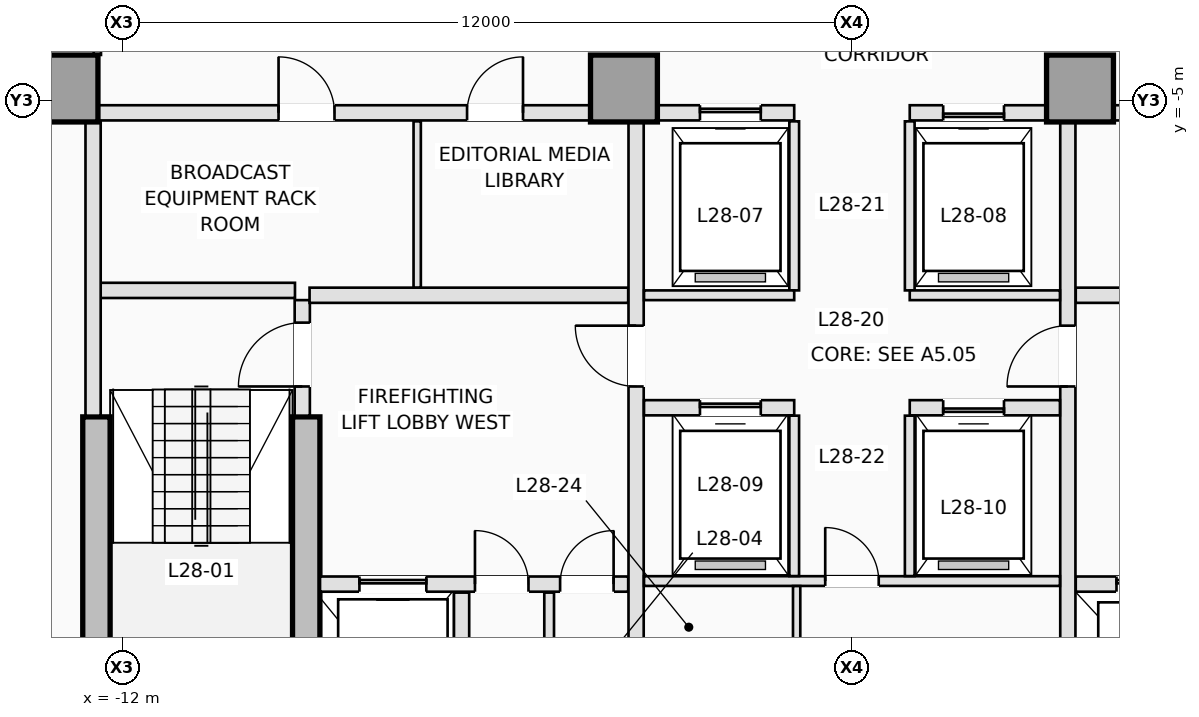
"""IFC4 building model, lengths in metres.
Left out: names, types, materials, properties, quantities, classifications, styles, units other than length and angle.
Written with IfcOpenShell. Run it as: python <this file> out.ifc"""

import sys

from ifc_helpers import new_model, si_unit, direction, frame, frame_2d, origin, origin_2d, place, context, subcontext, project, spatial, rectangle, extrude, element, fill, save


model = new_model("IFC4")
c1 = context("Model", 3, precision=1e-05, world=origin(), true_north=direction((0.0, 1.0)))
c2 = subcontext(c1, "Body", "Model", "MODEL_VIEW")
j1 = project(units=[si_unit("LENGTHUNIT", "METRE"), si_unit("PLANEANGLEUNIT", "RADIAN")], contexts=[c1])
p1 = place(None, origin())
s1 = spatial("IfcSite", under=j1, at=p1, CompositionType="ELEMENT")
p2 = place(p1, origin())
s2 = spatial("IfcBuilding", under=s1, at=p2, CompositionType="ELEMENT")
p3 = place(p2, frame((0.0, 0.0, 105.5)))
s3 = spatial("IfcBuildingStorey", under=s2, at=p3, CompositionType="ELEMENT", Elevation=105.5)
p4 = place(p3, frame((-12.425, -15.725, 0.0), z_axis=(0.0, 0.0, 1.0), x_axis=(0.0, 1.0, 0.0)))
e1 = element("IfcWall", 1, at=p4, inside=s3, PredefinedType="SHEAR", context=c2, shape_type="SweptSolid", body=[
    extrude(rectangle(XDim=5.525, YDim=0.45, at=frame_2d((2.763, 0.0))), origin(), (0.0, 0.0, 1.0), 3.5),
])
p5 = place(p3, frame((-8.975, -16.15, 0.0), z_axis=(0.0, 0.0, 1.0), x_axis=(0.0, 1.0, 0.0)))
e2 = element("IfcWall", 2, at=p5, inside=s3, PredefinedType="SHEAR", context=c2, shape_type="SweptSolid", body=[
    extrude(rectangle(XDim=5.95, YDim=0.45, at=frame_2d((2.975, 0.0))), origin(), (0.0, 0.0, 1.0), 3.5),
])
for number, where, z_axis, x_axis in (
    (3, (-12.95, -4.8, 0.0), (0.0, 0.0, 1.0), (1.0, 0.0, 0.0)),
    (4, (-3.75, -4.8, 0.0), (0.0, 0.0, 1.0), (1.0, 0.0, 0.0)),
    (5, (3.75, -4.8, 0.0), (0.0, 0.0, 1.0), (1.0, 0.0, 0.0)),
):
    element("IfcColumn", number, at=place(p3, frame(where, z_axis=z_axis, x_axis=x_axis)), inside=s3, PredefinedType="COLUMN", context=c2, shape_type="SweptSolid", body=[
        extrude(rectangle(XDim=1.1, YDim=1.1, at=origin_2d()), origin(), (0.0, 0.0, 1.0), 3.5),
    ])
p6 = place(p3, frame((-9.04, -10.18, 0.0), z_axis=(0.0, 0.0, 1.0), x_axis=(0.0, 1.0, 0.0)))
e6 = element("IfcWall", 6, at=p6, inside=s3, PredefinedType="PARTITIONING", context=c2, shape_type="SweptSolid", body=[
    extrude(rectangle(XDim=1.9, YDim=0.25, at=frame_2d((0.95, 0.0))), origin(), (0.0, 0.0, 1.0), 3.25),
])
p7 = place(p6, frame((0.48, 0.0, 0.0)))
e7 = element("IfcOpeningElement", 7, at=p7, cuts=e6, PredefinedType="OPENING", context=c2, shape_type="SweptSolid", body=[
    extrude(rectangle(XDim=1.05, YDim=2.15, at=frame_2d((0.525, 1.075))), frame((0.0, 0.135, 0.0), z_axis=(0.0, -1.0, 0.0), x_axis=(1.0, 0.0, 0.0)), (0.0, 0.0, 1.0), 0.27),
])
p8 = place(p3, frame((-12.38, -8.12, 0.0), z_axis=(0.0, 0.0, 1.0), x_axis=(1.0, 0.0, 0.0)))
e8 = element("IfcWall", 8, at=p8, inside=s3, PredefinedType="PARTITIONING", context=c2, shape_type="SweptSolid", body=[
    extrude(rectangle(XDim=3.22, YDim=0.25, at=frame_2d((1.61, 0.0))), origin(), (0.0, 0.0, 1.0), 3.25),
])
p9 = place(p3, frame((-12.48, -10.18, 0.0), z_axis=(0.0, 0.0, 1.0), x_axis=(0.0, 1.0, 0.0)))
e9 = element("IfcWall", 9, at=p9, inside=s3, PredefinedType="PARTITIONING", context=c2, shape_type="SweptSolid", body=[
    extrude(rectangle(XDim=4.828, YDim=0.25, at=frame_2d((2.414, 0.0))), origin(), (0.0, 0.0, 1.0), 3.25),
])
p10 = place(p3, frame((-8.748, -12.95, 0.0), z_axis=(0.0, 0.0, 1.0), x_axis=(1.0, 0.0, 0.0)))
e10 = element("IfcWall", 10, at=p10, inside=s3, PredefinedType="PARTITIONING", context=c2, shape_type="SweptSolid", body=[
    extrude(rectangle(XDim=5.068, YDim=0.25, at=frame_2d((2.534, 0.0))), origin(), (0.0, 0.0, 1.0), 3.25),
])
p11 = place(p10, frame((0.648, 0.0, 0.0)))
e11 = element("IfcOpeningElement", 11, at=p11, cuts=e10, PredefinedType="OPENING", context=c2, shape_type="SweptSolid", body=[
    extrude(rectangle(XDim=1.1, YDim=2.15, at=frame_2d((0.55, 1.075))), frame((0.0, 0.135, 0.0), z_axis=(0.0, -1.0, 0.0), x_axis=(1.0, 0.0, 0.0)), (0.0, 0.0, 1.0), 0.27),
])
p12 = place(p10, frame((2.548, 0.0, 0.0)))
e12 = element("IfcOpeningElement", 12, at=p12, cuts=e10, PredefinedType="OPENING", context=c2, shape_type="SweptSolid", body=[
    extrude(rectangle(XDim=0.88, YDim=2.1, at=frame_2d((0.44, 1.05))), frame((0.0, 0.135, 0.0), z_axis=(0.0, -1.0, 0.0), x_axis=(1.0, 0.0, 0.0)), (0.0, 0.0, 1.0), 0.27),
])
p13 = place(p10, frame((3.948, 0.0, 0.0)))
e13 = element("IfcOpeningElement", 13, at=p13, cuts=e10, PredefinedType="OPENING", context=c2, shape_type="SweptSolid", body=[
    extrude(rectangle(XDim=0.88, YDim=2.1, at=frame_2d((0.44, 1.05))), frame((0.0, 0.135, 0.0), z_axis=(0.0, -1.0, 0.0), x_axis=(1.0, 0.0, 0.0)), (0.0, 0.0, 1.0), 0.27),
])
p14 = place(p3, frame((3.68, -12.95, 0.0), z_axis=(0.0, 0.0, 1.0), x_axis=(1.0, 0.0, 0.0)))
e14 = element("IfcWall", 14, at=p14, inside=s3, PredefinedType="PARTITIONING", context=c2, shape_type="SweptSolid", body=[
    extrude(rectangle(XDim=5.068, YDim=0.25, at=frame_2d((2.534, 0.0))), origin(), (0.0, 0.0, 1.0), 3.25),
])
p15 = place(p14, frame((3.32, 0.0, 0.0)))
e15 = element("IfcOpeningElement", 15, at=p15, cuts=e14, PredefinedType="OPENING", context=c2, shape_type="SweptSolid", body=[
    extrude(rectangle(XDim=1.1, YDim=2.15, at=frame_2d((0.55, 1.075))), frame((0.0, 0.135, 0.0), z_axis=(0.0, -1.0, 0.0), x_axis=(1.0, 0.0, 0.0)), (0.0, 0.0, 1.0), 0.27),
])
p16 = place(p14, frame((0.67, 0.0, 0.0)))
e16 = element("IfcOpeningElement", 16, at=p16, cuts=e14, PredefinedType="OPENING", context=c2, shape_type="SweptSolid", body=[
    extrude(rectangle(XDim=1.2, YDim=2.15, at=frame_2d((0.6, 1.075))), frame((0.0, 0.135, 0.0), z_axis=(0.0, -1.0, 0.0), x_axis=(1.0, 0.0, 0.0)), (0.0, 0.0, 1.0), 0.27),
])
p17 = place(p3, frame((-6.42, -15.92, 0.0), z_axis=(0.0, 0.0, 1.0), x_axis=(0.0, 1.0, 0.0)))
e17 = element("IfcWall", 17, at=p17, inside=s3, PredefinedType="PARTITIONING", context=c2, shape_type="SweptSolid", body=[
    extrude(rectangle(XDim=2.83, YDim=0.25, at=frame_2d((1.415, 0.0))), origin(), (0.0, 0.0, 1.0), 3.25),
])
p18 = place(p3, frame((-4.98, -15.92, 0.0), z_axis=(0.0, 0.0, 1.0), x_axis=(0.0, 1.0, 0.0)))
e18 = element("IfcWall", 18, at=p18, inside=s3, PredefinedType="PARTITIONING", context=c2, shape_type="SweptSolid", body=[
    extrude(rectangle(XDim=2.83, YDim=0.16, at=frame_2d((1.415, 0.0))), origin(), (0.0, 0.0, 1.0), 3.25),
])
for number, where, z_axis, x_axis in (
    (19, (-8.92, -8.2, 0.0), (0.0, 0.0, 1.0), (1.0, 0.0, 0.0)),
    (20, (3.68, -8.2, 0.0), (0.0, 0.0, 1.0), (1.0, 0.0, 0.0)),
):
    element("IfcWall", number, at=place(p3, frame(where, z_axis=z_axis, x_axis=x_axis)), inside=s3, PredefinedType="PARTITIONING", context=c2, shape_type="SweptSolid", body=[
        extrude(rectangle(XDim=5.24, YDim=0.25, at=frame_2d((2.62, 0.0))), origin(), (0.0, 0.0, 1.0), 3.25),
    ])
p19 = place(p3, frame((-3.55, -15.798, 0.0), z_axis=(0.0, 0.0, 1.0), x_axis=(0.0, 1.0, 0.0)))
e21 = element("IfcWall", 21, at=p19, inside=s3, PredefinedType="PARTITIONING", context=c2, shape_type="SweptSolid", body=[
    extrude(rectangle(XDim=10.446, YDim=0.25, at=frame_2d((5.223, 0.0))), origin(), (0.0, 0.0, 1.0), 3.25),
])
p20 = place(p19, frame((6.098, 0.0, 0.0)))
e22 = element("IfcOpeningElement", 22, at=p20, cuts=e21, PredefinedType="OPENING", context=c2, shape_type="SweptSolid", body=[
    extrude(rectangle(XDim=1.0, YDim=2.15, at=frame_2d((0.5, 1.075))), frame((0.0, 0.135, 0.0), z_axis=(0.0, -1.0, 0.0), x_axis=(1.0, 0.0, 0.0)), (0.0, 0.0, 1.0), 0.27),
])
p21 = place(p3, frame((3.55, -15.798, 0.0), z_axis=(0.0, 0.0, 1.0), x_axis=(0.0, 1.0, 0.0)))
e23 = element("IfcWall", 23, at=p21, inside=s3, PredefinedType="PARTITIONING", context=c2, shape_type="SweptSolid", body=[
    extrude(rectangle(XDim=10.446, YDim=0.25, at=frame_2d((5.223, 0.0))), origin(), (0.0, 0.0, 1.0), 3.25),
])
p22 = place(p21, frame((6.098, 0.0, 0.0)))
e24 = element("IfcOpeningElement", 24, at=p22, cuts=e23, PredefinedType="OPENING", context=c2, shape_type="SweptSolid", body=[
    extrude(rectangle(XDim=1.0, YDim=2.15, at=frame_2d((0.5, 1.075))), frame((0.0, 0.135, 0.0), z_axis=(0.0, -1.0, 0.0), x_axis=(1.0, 0.0, 0.0)), (0.0, 0.0, 1.0), 0.27),
])
p23 = place(p3, frame((-12.398, -5.2, 0.0), z_axis=(0.0, 0.0, 1.0), x_axis=(1.0, 0.0, 0.0)))
e25 = element("IfcWall", 25, at=p23, inside=s3, PredefinedType="PARTITIONING", context=c2, shape_type="SweptSolid", body=[
    extrude(rectangle(XDim=8.096, YDim=0.25, at=frame_2d((4.048, 0.0))), origin(), (0.0, 0.0, 1.0), 3.25),
])
p24 = place(p23, frame((2.968, 0.0, 0.0)))
e26 = element("IfcOpeningElement", 26, at=p24, cuts=e25, PredefinedType="OPENING", context=c2, shape_type="SweptSolid", body=[
    extrude(rectangle(XDim=0.92, YDim=2.12, at=frame_2d((0.46, 1.06))), frame((0.0, 0.135, 0.0), z_axis=(0.0, -1.0, 0.0), x_axis=(1.0, 0.0, 0.0)), (0.0, 0.0, 1.0), 0.27),
])
p25 = place(p23, frame((6.068, 0.0, 0.0)))
e27 = element("IfcOpeningElement", 27, at=p25, cuts=e25, PredefinedType="OPENING", context=c2, shape_type="SweptSolid", body=[
    extrude(rectangle(XDim=0.92, YDim=2.12, at=frame_2d((0.46, 1.06))), frame((0.0, 0.135, 0.0), z_axis=(0.0, -1.0, 0.0), x_axis=(1.0, 0.0, 0.0)), (0.0, 0.0, 1.0), 0.27),
])
p26 = place(p3, frame((4.302, -5.2, 0.0), z_axis=(0.0, 0.0, 1.0), x_axis=(1.0, 0.0, 0.0)))
e28 = element("IfcWall", 28, at=p26, inside=s3, PredefinedType="PARTITIONING", context=c2, shape_type="SweptSolid", body=[
    extrude(rectangle(XDim=8.096, YDim=0.25, at=frame_2d((4.048, 0.0))), origin(), (0.0, 0.0, 1.0), 3.25),
])
p27 = place(p3, frame((-3.198, -5.2, 0.0), z_axis=(0.0, 0.0, 1.0), x_axis=(1.0, 0.0, 0.0)))
e29 = element("IfcWall", 29, at=p27, inside=s3, PredefinedType="PARTITIONING", context=c2, shape_type="SweptSolid", body=[
    extrude(rectangle(XDim=2.248, YDim=0.25, at=frame_2d((1.124, 0.0))), origin(), (0.0, 0.0, 1.0), 3.25),
])
p28 = place(p27, frame((0.698, 0.0, 0.0)))
e30 = element("IfcOpeningElement", 30, at=p28, cuts=e29, PredefinedType="OPENING", context=c2, shape_type="SweptSolid", body=[
    extrude(rectangle(XDim=1.0, YDim=2.15, at=frame_2d((0.5, 1.075))), frame((0.0, 0.135, 0.0), z_axis=(0.0, -1.0, 0.0), x_axis=(1.0, 0.0, 0.0)), (0.0, 0.0, 1.0), 0.27),
])
p29 = place(p3, frame((0.95, -5.2, 0.0), z_axis=(0.0, 0.0, 1.0), x_axis=(1.0, 0.0, 0.0)))
e31 = element("IfcWall", 31, at=p29, inside=s3, PredefinedType="PARTITIONING", context=c2, shape_type="SweptSolid", body=[
    extrude(rectangle(XDim=2.248, YDim=0.25, at=frame_2d((1.124, 0.0))), origin(), (0.0, 0.0, 1.0), 3.25),
])
p30 = place(p29, frame((0.55, 0.0, 0.0)))
e32 = element("IfcOpeningElement", 32, at=p30, cuts=e31, PredefinedType="OPENING", context=c2, shape_type="SweptSolid", body=[
    extrude(rectangle(XDim=1.0, YDim=2.15, at=frame_2d((0.5, 1.075))), frame((0.0, 0.135, 0.0), z_axis=(0.0, -1.0, 0.0), x_axis=(1.0, 0.0, 0.0)), (0.0, 0.0, 1.0), 0.27),
])
p31 = place(p3, frame((-7.15, -8.073, 0.0), z_axis=(0.0, 0.0, 1.0), x_axis=(0.0, 1.0, 0.0)))
e33 = element("IfcWall", 33, at=p31, inside=s3, PredefinedType="PARTITIONING", context=c2, shape_type="SweptSolid", body=[
    extrude(rectangle(XDim=2.733, YDim=0.12, at=frame_2d((1.366, 0.0))), origin(), (0.0, 0.0, 1.0), 3.25),
])
for number, where, z_axis, x_axis in (
    (34, (-0.95, -8.12, 0.0), (0.0, 0.0, 1.0), (0.0, 1.0, 0.0)),
    (35, (0.95, -8.12, 0.0), (0.0, 0.0, 1.0), (0.0, 1.0, 0.0)),
):
    element("IfcWall", number, at=place(p3, frame(where, z_axis=z_axis, x_axis=x_axis)), inside=s3, PredefinedType="PARTITIONING", context=c2, shape_type="SweptSolid", body=[
        extrude(rectangle(XDim=2.78, YDim=0.16, at=frame_2d((1.39, 0.0))), origin(), (0.0, 0.0, 1.0), 3.25),
    ])
for number, where, z_axis, x_axis in (
    (36, (-3.42, -8.2, 0.0), (0.0, 0.0, 1.0), (1.0, 0.0, 0.0)),
    (37, (0.95, -8.2, 0.0), (0.0, 0.0, 1.0), (1.0, 0.0, 0.0)),
):
    element("IfcWall", number, at=place(p3, frame(where, z_axis=z_axis, x_axis=x_axis)), inside=s3, PredefinedType="PARTITIONING", context=c2, shape_type="SweptSolid", body=[
        extrude(rectangle(XDim=2.47, YDim=0.16, at=frame_2d((1.235, 0.0))), origin(), (0.0, 0.0, 1.0), 3.25),
    ])
p32 = place(p3, frame((-3.42, -10.05, 0.0), z_axis=(0.0, 0.0, 1.0), x_axis=(1.0, 0.0, 0.0)))
e38 = element("IfcWall", 38, at=p32, inside=s3, PredefinedType="PARTITIONING", context=c2, shape_type="SweptSolid", body=[
    extrude(rectangle(XDim=2.47, YDim=0.25, at=frame_2d((1.235, 0.0))), origin(), (0.0, 0.0, 1.0), 3.25),
])
p33 = place(p32, frame((0.92, 0.0, 0.0)))
e39 = element("IfcOpeningElement", 39, at=p33, cuts=e38, PredefinedType="OPENING", context=c2, shape_type="SweptSolid", body=[
    extrude(rectangle(XDim=1.0, YDim=2.15, at=frame_2d((0.5, 1.075))), frame((0.0, 0.135, 0.0), z_axis=(0.0, -1.0, 0.0), x_axis=(1.0, 0.0, 0.0)), (0.0, 0.0, 1.0), 0.27),
])
p34 = place(p3, frame((0.95, -10.05, 0.0), z_axis=(0.0, 0.0, 1.0), x_axis=(1.0, 0.0, 0.0)))
e40 = element("IfcWall", 40, at=p34, inside=s3, PredefinedType="PARTITIONING", context=c2, shape_type="SweptSolid", body=[
    extrude(rectangle(XDim=2.47, YDim=0.25, at=frame_2d((1.235, 0.0))), origin(), (0.0, 0.0, 1.0), 3.25),
])
p35 = place(p34, frame((0.55, 0.0, 0.0)))
e41 = element("IfcOpeningElement", 41, at=p35, cuts=e40, PredefinedType="OPENING", context=c2, shape_type="SweptSolid", body=[
    extrude(rectangle(XDim=1.0, YDim=2.15, at=frame_2d((0.5, 1.075))), frame((0.0, 0.135, 0.0), z_axis=(0.0, -1.0, 0.0), x_axis=(1.0, 0.0, 0.0)), (0.0, 0.0, 1.0), 0.27),
])
p36 = place(p3, frame((-3.42, -12.9, 0.0), z_axis=(0.0, 0.0, 1.0), x_axis=(1.0, 0.0, 0.0)))
e42 = element("IfcWall", 42, at=p36, inside=s3, PredefinedType="PARTITIONING", context=c2, shape_type="SweptSolid", body=[
    extrude(rectangle(XDim=6.84, YDim=0.16, at=frame_2d((3.42, 0.0))), origin(), (0.0, 0.0, 1.0), 3.25),
])
p37 = place(p36, frame((2.98, 0.0, 0.0)))
e43 = element("IfcOpeningElement", 43, at=p37, cuts=e42, PredefinedType="OPENING", context=c2, shape_type="SweptSolid", body=[
    extrude(rectangle(XDim=0.88, YDim=2.12, at=frame_2d((0.44, 1.06))), frame((0.0, 0.09, 0.0), z_axis=(0.0, -1.0, 0.0), x_axis=(1.0, 0.0, 0.0)), (0.0, 0.0, 1.0), 0.18),
])
for number, where, z_axis, x_axis in (
    (44, (-0.95, -12.818, 0.0), (0.0, 0.0, 1.0), (0.0, 1.0, 0.0)),
    (45, (0.95, -12.818, 0.0), (0.0, 0.0, 1.0), (0.0, 1.0, 0.0)),
):
    element("IfcWall", number, at=place(p3, frame(where, z_axis=z_axis, x_axis=x_axis)), inside=s3, PredefinedType="PARTITIONING", context=c2, shape_type="SweptSolid", body=[
        extrude(rectangle(XDim=2.638, YDim=0.16, at=frame_2d((1.319, 0.0))), origin(), (0.0, 0.0, 1.0), 3.25),
    ])
p38 = place(p3, frame((-0.91, -16.02, 0.0), z_axis=(0.0, 0.0, 1.0), x_axis=(0.0, 1.0, 0.0)))
e46 = element("IfcWall", 46, at=p38, inside=s3, PredefinedType="PARTITIONING", context=c2, shape_type="SweptSolid", body=[
    extrude(rectangle(XDim=3.038, YDim=0.12, at=frame_2d((1.519, 0.0))), origin(), (0.0, 0.0, 1.0), 3.25),
])
p39 = place(p38, frame((1.05, 0.0, 0.0)))
e47 = element("IfcOpeningElement", 47, at=p39, cuts=e46, PredefinedType="OPENING", context=c2, shape_type="SweptSolid", body=[
    extrude(rectangle(XDim=0.88, YDim=2.12, at=frame_2d((0.44, 1.06))), frame((0.0, 0.07, 0.0), z_axis=(0.0, -1.0, 0.0), x_axis=(1.0, 0.0, 0.0)), (0.0, 0.0, 1.0), 0.14),
])
p40 = place(p3, frame((-12.41, -4.248, 0.0), z_axis=(0.0, 0.0, 1.0), x_axis=(0.0, 1.0, 0.0)))
e48 = element("IfcWall", 48, at=p40, inside=s3, PredefinedType="PARTITIONING", context=c2, shape_type="SweptSolid", body=[
    extrude(rectangle(XDim=1.848, YDim=0.12, at=frame_2d((0.924, 0.0))), origin(), (0.0, 0.0, 1.0), 3.25),
])
p41 = place(p28, origin())
e49 = element("IfcDoor", 49, at=p41, inside=s3, OperationType="SLIDING_TO_LEFT", PredefinedType="DOOR", context=c2, shape_type="SweptSolid", body=[
    extrude(rectangle(XDim=1.0, YDim=2.15, at=frame_2d((0.5, 1.075))), frame((0.0, 0.025, 0.0), z_axis=(0.0, -1.0, 0.0), x_axis=(1.0, 0.0, 0.0)), (0.0, 0.0, 1.0), 0.05),
])
fill(e30, e49)
p42 = place(p30, origin())
e50 = element("IfcDoor", 50, at=p42, inside=s3, OperationType="SLIDING_TO_RIGHT", PredefinedType="DOOR", context=c2, shape_type="SweptSolid", body=[
    extrude(rectangle(XDim=1.0, YDim=2.15, at=frame_2d((0.5, 1.075))), frame((0.0, 0.025, 0.0), z_axis=(0.0, -1.0, 0.0), x_axis=(1.0, 0.0, 0.0)), (0.0, 0.0, 1.0), 0.05),
])
fill(e32, e50)
p43 = place(p11, origin())
e51 = element("IfcDoor", 51, at=p43, inside=s3, OperationType="SLIDING_TO_LEFT", PredefinedType="DOOR", context=c2, shape_type="SweptSolid", body=[
    extrude(rectangle(XDim=1.1, YDim=2.15, at=frame_2d((0.55, 1.075))), frame((0.0, 0.025, 0.0), z_axis=(0.0, -1.0, 0.0), x_axis=(1.0, 0.0, 0.0)), (0.0, 0.0, 1.0), 0.05),
])
fill(e11, e51)
p44 = place(p16, origin())
e52 = element("IfcDoor", 52, at=p44, inside=s3, OperationType="SLIDING_TO_LEFT", PredefinedType="DOOR", context=c2, shape_type="SweptSolid", body=[
    extrude(rectangle(XDim=1.2, YDim=2.15, at=frame_2d((0.6, 1.075))), frame((0.0, 0.025, 0.0), z_axis=(0.0, -1.0, 0.0), x_axis=(1.0, 0.0, 0.0)), (0.0, 0.0, 1.0), 0.05),
])
fill(e16, e52)
p45 = place(p33, origin())
e53 = element("IfcDoor", 53, at=p45, inside=s3, OperationType="SLIDING_TO_LEFT", PredefinedType="DOOR", context=c2, shape_type="SweptSolid", body=[
    extrude(rectangle(XDim=1.0, YDim=2.15, at=frame_2d((0.5, 1.075))), frame((0.0, 0.025, 0.0), z_axis=(0.0, -1.0, 0.0), x_axis=(1.0, 0.0, 0.0)), (0.0, 0.0, 1.0), 0.05),
])
fill(e39, e53)
p46 = place(p35, origin())
e54 = element("IfcDoor", 54, at=p46, inside=s3, OperationType="SLIDING_TO_RIGHT", PredefinedType="DOOR", context=c2, shape_type="SweptSolid", body=[
    extrude(rectangle(XDim=1.0, YDim=2.15, at=frame_2d((0.5, 1.075))), frame((0.0, 0.025, 0.0), z_axis=(0.0, -1.0, 0.0), x_axis=(1.0, 0.0, 0.0)), (0.0, 0.0, 1.0), 0.05),
])
fill(e41, e54)
p47 = place(p7, origin())
e55 = element("IfcDoor", 55, at=p47, inside=s3, OperationType="SINGLE_SWING_LEFT", PredefinedType="DOOR", context=c2, shape_type="SweptSolid", body=[
    extrude(rectangle(XDim=1.05, YDim=2.15, at=frame_2d((0.525, 1.075))), frame((0.0, 0.025, 0.0), z_axis=(0.0, -1.0, 0.0), x_axis=(1.0, 0.0, 0.0)), (0.0, 0.0, 1.0), 0.05),
])
fill(e7, e55)
p48 = place(p12, origin())
e56 = element("IfcDoor", 56, at=p48, inside=s3, OperationType="SINGLE_SWING_LEFT", PredefinedType="TRAPDOOR", context=c2, shape_type="SweptSolid", body=[
    extrude(rectangle(XDim=0.88, YDim=2.1, at=frame_2d((0.44, 1.05))), frame((0.0, 0.025, 0.0), z_axis=(0.0, -1.0, 0.0), x_axis=(1.0, 0.0, 0.0)), (0.0, 0.0, 1.0), 0.05),
])
fill(e12, e56)
p49 = place(p13, origin())
e57 = element("IfcDoor", 57, at=p49, inside=s3, OperationType="SINGLE_SWING_RIGHT", PredefinedType="TRAPDOOR", context=c2, shape_type="SweptSolid", body=[
    extrude(rectangle(XDim=0.88, YDim=2.1, at=frame_2d((0.44, 1.05))), frame((0.0, 0.025, 0.0), z_axis=(0.0, -1.0, 0.0), x_axis=(1.0, 0.0, 0.0)), (0.0, 0.0, 1.0), 0.05),
])
fill(e13, e57)
p50 = place(p20, origin())
e58 = element("IfcDoor", 58, at=p50, inside=s3, OperationType="SINGLE_SWING_RIGHT", PredefinedType="DOOR", context=c2, shape_type="SweptSolid", body=[
    extrude(rectangle(XDim=1.0, YDim=2.15, at=frame_2d((0.5, 1.075))), frame((0.0, 0.025, 0.0), z_axis=(0.0, -1.0, 0.0), x_axis=(1.0, 0.0, 0.0)), (0.0, 0.0, 1.0), 0.05),
])
fill(e22, e58)
p51 = place(p22, origin())
e59 = element("IfcDoor", 59, at=p51, inside=s3, OperationType="SINGLE_SWING_LEFT", PredefinedType="DOOR", context=c2, shape_type="SweptSolid", body=[
    extrude(rectangle(XDim=1.0, YDim=2.15, at=frame_2d((0.5, 1.075))), frame((0.0, 0.025, 0.0), z_axis=(0.0, -1.0, 0.0), x_axis=(1.0, 0.0, 0.0)), (0.0, 0.0, 1.0), 0.05),
])
fill(e24, e59)
p52 = place(p24, origin())
e60 = element("IfcDoor", 60, at=p52, inside=s3, OperationType="SINGLE_SWING_LEFT", PredefinedType="DOOR", context=c2, shape_type="SweptSolid", body=[
    extrude(rectangle(XDim=0.92, YDim=2.12, at=frame_2d((0.46, 1.06))), frame((0.0, 0.025, 0.0), z_axis=(0.0, -1.0, 0.0), x_axis=(1.0, 0.0, 0.0)), (0.0, 0.0, 1.0), 0.05),
])
fill(e26, e60)
p53 = place(p25, origin())
e61 = element("IfcDoor", 61, at=p53, inside=s3, OperationType="SINGLE_SWING_RIGHT", PredefinedType="DOOR", context=c2, shape_type="SweptSolid", body=[
    extrude(rectangle(XDim=0.92, YDim=2.12, at=frame_2d((0.46, 1.06))), frame((0.0, 0.025, 0.0), z_axis=(0.0, -1.0, 0.0), x_axis=(1.0, 0.0, 0.0)), (0.0, 0.0, 1.0), 0.05),
])
fill(e27, e61)
p54 = place(p37, origin())
e62 = element("IfcDoor", 62, at=p54, inside=s3, OperationType="SINGLE_SWING_LEFT", PredefinedType="DOOR", context=c2, shape_type="SweptSolid", body=[
    extrude(rectangle(XDim=0.88, YDim=2.12, at=frame_2d((0.44, 1.06))), frame((0.0, 0.025, 0.0), z_axis=(0.0, -1.0, 0.0), x_axis=(1.0, 0.0, 0.0)), (0.0, 0.0, 1.0), 0.05),
])
fill(e43, e62)
save(model, sys.argv[1])
